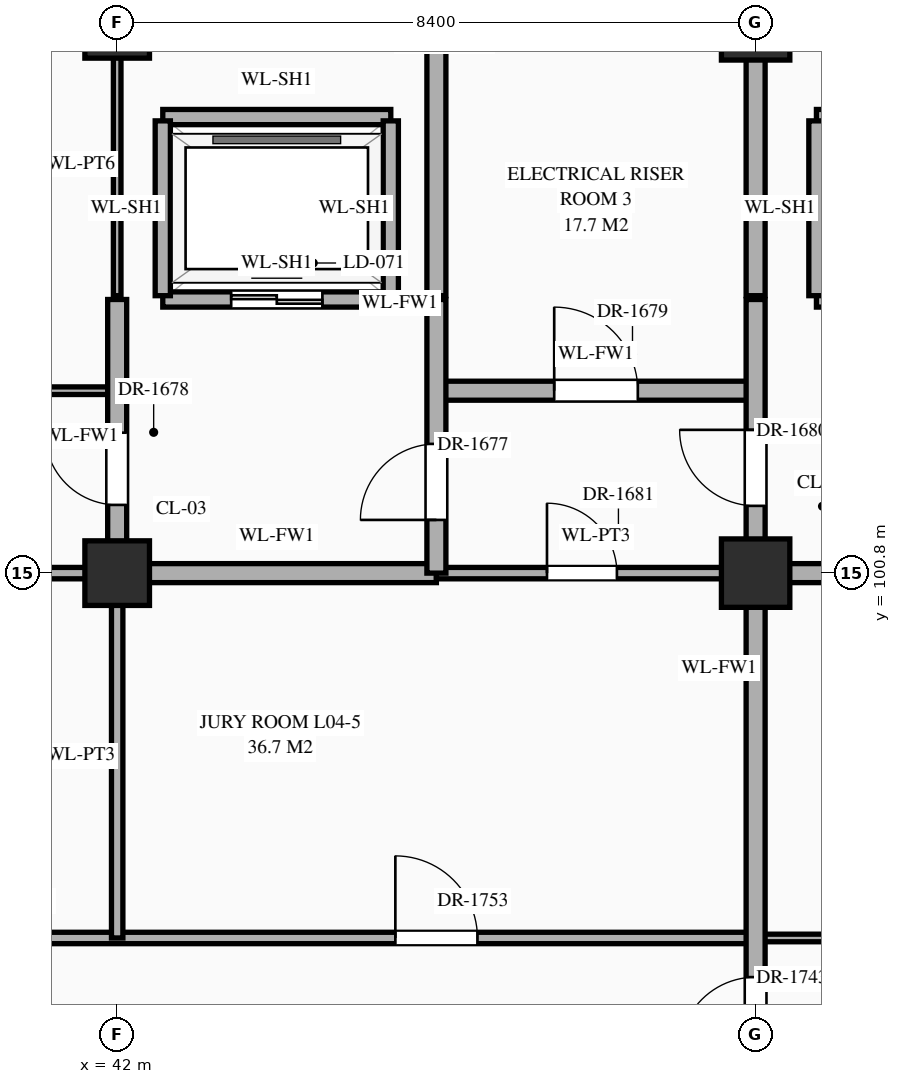
"""IFC4 building model, lengths in metres.
Left out: names, types, materials, properties, quantities, classifications, styles, units other than length and angle.
Written with IfcOpenShell. Run it as: python <this file> out.ifc"""

import sys

from ifc_helpers import new_model, si_unit, direction, frame, frame_2d, origin, origin_2d, place, context, subcontext, project, spatial, rectangle, extrude, element, fill, save


model = new_model("IFC4")
c1 = context("Model", 3, precision=1e-05, world=origin(), true_north=direction((0.0, 1.0)))
c2 = subcontext(c1, "Body", "Model", "MODEL_VIEW")
j1 = project(units=[si_unit("LENGTHUNIT", "METRE"), si_unit("PLANEANGLEUNIT", "RADIAN")], contexts=[c1])
p1 = place(None, origin())
s1 = spatial("IfcSite", under=j1, at=p1, CompositionType="ELEMENT")
p2 = place(p1, origin())
s2 = spatial("IfcBuilding", under=s1, at=p2, CompositionType="ELEMENT")
p3 = place(p2, frame((0.0, 0.0, 16.2)))
s3 = spatial("IfcBuildingStorey", under=s2, at=p3, CompositionType="ELEMENT", Elevation=16.2)
for number, where, z_axis, x_axis in (
    (1, (42.0, 100.8, 0.0), (0.0, 0.0, 1.0), (1.0, 0.0, 0.0)),
    (2, (42.0, 108.0, 0.0), (0.0, 0.0, 1.0), (1.0, 0.0, 0.0)),
):
    element("IfcColumn", number, at=place(p3, frame(where, z_axis=z_axis, x_axis=x_axis)), inside=s3, PredefinedType="COLUMN", context=c2, shape_type="SweptSolid", body=[
        extrude(rectangle(XDim=0.85, YDim=0.85, at=origin_2d()), origin(), (0.0, 0.0, 1.0), 5.4),
    ])
for number, where, z_axis, x_axis in (
    (3, (50.4, 100.8, 0.0), (0.0, 0.0, 1.0), (1.0, 0.0, 0.0)),
    (4, (50.4, 108.0, 0.0), (0.0, 0.0, 1.0), (1.0, 0.0, 0.0)),
):
    element("IfcColumn", number, at=place(p3, frame(where, z_axis=z_axis, x_axis=x_axis)), inside=s3, PredefinedType="COLUMN", context=c2, shape_type="SweptSolid", body=[
        extrude(rectangle(XDim=0.9, YDim=0.9, at=origin_2d()), origin(), (0.0, 0.0, 1.0), 5.4),
    ])
p4 = place(p3, frame((31.0, 96.0, 0.0), z_axis=(0.0, 0.0, 1.0), x_axis=(1.0, 0.0, 0.0)))
e5 = element("IfcWall", 5, at=p4, inside=s3, PredefinedType="STANDARD", context=c2, shape_type="SweptSolid", body=[
    extrude(rectangle(XDim=19.4, YDim=0.15, at=frame_2d((9.7, 0.0))), origin(), (0.0, 0.0, 1.0), 5.12),
])
p5 = place(p4, frame((0.8, 0.0, 0.0)))
e6 = element("IfcOpeningElement", 6, at=p5, cuts=e5, PredefinedType="OPENING", context=c2, shape_type="SweptSolid", body=[
    extrude(rectangle(XDim=1.0, YDim=2.25, at=frame_2d((0.5, 1.125))), frame((0.0, 0.087, 0.0), z_axis=(0.0, -1.0, 0.0), x_axis=(1.0, 0.0, 0.0)), (0.0, 0.0, 1.0), 0.174),
])
p6 = place(p4, frame((6.28, 0.0, 0.0)))
e7 = element("IfcOpeningElement", 7, at=p6, cuts=e5, PredefinedType="OPENING", context=c2, shape_type="SweptSolid", body=[
    extrude(rectangle(XDim=1.04, YDim=2.2, at=frame_2d((0.52, 1.1))), frame((0.0, 0.087, 0.0), z_axis=(0.0, -1.0, 0.0), x_axis=(1.0, 0.0, 0.0)), (0.0, 0.0, 1.0), 0.174),
])
p7 = place(p4, frame((14.66, 0.0, 0.0)))
e8 = element("IfcOpeningElement", 8, at=p7, cuts=e5, PredefinedType="OPENING", context=c2, shape_type="SweptSolid", body=[
    extrude(rectangle(XDim=1.08, YDim=2.25, at=frame_2d((0.54, 1.125))), frame((0.0, 0.087, 0.0), z_axis=(0.0, -1.0, 0.0), x_axis=(1.0, 0.0, 0.0)), (0.0, 0.0, 1.0), 0.174),
])
p8 = place(p3, frame((50.4, 96.0, 0.0), z_axis=(0.0, 0.0, 1.0), x_axis=(1.0, 0.0, 0.0)))
e9 = element("IfcWall", 9, at=p8, inside=s3, PredefinedType="STANDARD", context=c2, shape_type="SweptSolid", body=[
    extrude(rectangle(XDim=5.8, YDim=0.1, at=frame_2d((2.9, 0.0))), origin(), (0.0, 0.0, 1.0), 5.12),
])
p9 = place(p8, frame((1.13, 0.0, 0.0)))
e10 = element("IfcOpeningElement", 10, at=p9, cuts=e9, PredefinedType="OPENING", context=c2, shape_type="SweptSolid", body=[
    extrude(rectangle(XDim=1.14, YDim=2.4, at=frame_2d((0.57, 1.2))), frame((0.0, 0.062, 0.0), z_axis=(0.0, -1.0, 0.0), x_axis=(1.0, 0.0, 0.0)), (0.0, 0.0, 1.0), 0.124),
])
p10 = place(p8, frame((4.15, 0.0, 0.0)))
e11 = element("IfcOpeningElement", 11, at=p10, cuts=e9, PredefinedType="OPENING", context=c2, shape_type="SweptSolid", body=[
    extrude(rectangle(XDim=0.9, YDim=2.15, at=frame_2d((0.45, 1.075))), frame((0.0, 0.062, 0.0), z_axis=(0.0, -1.0, 0.0), x_axis=(1.0, 0.0, 0.0)), (0.0, 0.0, 1.0), 0.124),
])
p11 = place(p3, frame((31.0, 100.8, 0.0), z_axis=(0.0, 0.0, 1.0), x_axis=(1.0, 0.0, 0.0)))
e12 = element("IfcWall", 12, at=p11, inside=s3, PredefinedType="STANDARD", context=c2, shape_type="SweptSolid", body=[
    extrude(rectangle(XDim=11.0, YDim=0.15, at=frame_2d((5.5, 0.0))), origin(), (0.0, 0.0, 1.0), 4.27),
])
p12 = place(p11, frame((0.528, 0.0, 0.0)))
e13 = element("IfcOpeningElement", 13, at=p12, cuts=e12, PredefinedType="OPENING", context=c2, shape_type="SweptSolid", body=[
    extrude(rectangle(XDim=1.2, YDim=2.35, at=frame_2d((0.6, 1.175))), frame((0.0, 0.087, 0.0), z_axis=(0.0, -1.0, 0.0), x_axis=(1.0, 0.0, 0.0)), (0.0, 0.0, 1.0), 0.174),
])
p13 = place(p11, frame((6.18, 0.0, 0.0)))
e14 = element("IfcOpeningElement", 14, at=p13, cuts=e12, PredefinedType="OPENING", context=c2, shape_type="SweptSolid", body=[
    extrude(rectangle(XDim=1.24, YDim=2.3, at=frame_2d((0.62, 1.15))), frame((0.0, 0.087, 0.0), z_axis=(0.0, -1.0, 0.0), x_axis=(1.0, 0.0, 0.0)), (0.0, 0.0, 1.0), 0.174),
])
p14 = place(p3, frame((42.0, 100.8, 0.0), z_axis=(0.0, 0.0, 1.0), x_axis=(1.0, 0.0, 0.0)))
e15 = element("IfcWall", 15, at=p14, inside=s3, PredefinedType="STANDARD", context=c2, shape_type="SweptSolid", body=[
    extrude(rectangle(XDim=4.2, YDim=0.25, at=frame_2d((2.1, 0.0))), origin(), (0.0, 0.0, 1.0), 4.27),
])
p15 = place(p3, frame((46.2, 100.8, 0.0), z_axis=(0.0, 0.0, 1.0), x_axis=(1.0, 0.0, 0.0)))
e16 = element("IfcWall", 16, at=p15, inside=s3, PredefinedType="STANDARD", context=c2, shape_type="SweptSolid", body=[
    extrude(rectangle(XDim=4.2, YDim=0.15, at=frame_2d((2.1, 0.0))), origin(), (0.0, 0.0, 1.0), 4.27),
])
p16 = place(p15, frame((1.455, 0.0, 0.0)))
e17 = element("IfcOpeningElement", 17, at=p16, cuts=e16, PredefinedType="OPENING", context=c2, shape_type="SweptSolid", body=[
    extrude(rectangle(XDim=0.92, YDim=2.15, at=frame_2d((0.46, 1.075))), frame((0.0, 0.087, 0.0), z_axis=(0.0, -1.0, 0.0), x_axis=(1.0, 0.0, 0.0)), (0.0, 0.0, 1.0), 0.174),
])
p17 = place(p3, frame((50.4, 100.8, 0.0), z_axis=(0.0, 0.0, 1.0), x_axis=(1.0, 0.0, 0.0)))
e18 = element("IfcWall", 18, at=p17, inside=s3, PredefinedType="STANDARD", context=c2, shape_type="SweptSolid", body=[
    extrude(rectangle(XDim=3.4, YDim=0.25, at=frame_2d((1.7, 0.0))), origin(), (0.0, 0.0, 1.0), 4.27),
])
p18 = place(p17, frame((1.41, 0.0, 0.0)))
e19 = element("IfcOpeningElement", 19, at=p18, cuts=e18, PredefinedType="OPENING", context=c2, shape_type="SweptSolid", body=[
    extrude(rectangle(XDim=0.95, YDim=2.15, at=frame_2d((0.475, 1.075))), frame((0.0, 0.137, 0.0), z_axis=(0.0, -1.0, 0.0), x_axis=(1.0, 0.0, 0.0)), (0.0, 0.0, 1.0), 0.274),
])
p19 = place(p3, frame((0.04, 103.2, 0.0), z_axis=(0.0, 0.0, 1.0), x_axis=(1.0, 0.0, 0.0)))
e20 = element("IfcWall", 20, at=p19, inside=s3, PredefinedType="STANDARD", context=c2, shape_type="SweptSolid", body=[
    extrude(rectangle(XDim=41.96, YDim=0.1, at=frame_2d((20.98, 0.0))), origin(), (0.0, 0.0, 1.0), 5.05),
])
p20 = place(p19, frame((3.67, 0.0, 0.0)))
e21 = element("IfcOpeningElement", 21, at=p20, cuts=e20, PredefinedType="OPENING", context=c2, shape_type="SweptSolid", body=[
    extrude(rectangle(XDim=1.02, YDim=2.4, at=frame_2d((0.51, 1.2))), frame((0.0, 0.062, 0.0), z_axis=(0.0, -1.0, 0.0), x_axis=(1.0, 0.0, 0.0)), (0.0, 0.0, 1.0), 0.124),
])
p21 = place(p19, frame((12.03, 0.0, 0.0)))
e22 = element("IfcOpeningElement", 22, at=p21, cuts=e20, PredefinedType="OPENING", context=c2, shape_type="SweptSolid", body=[
    extrude(rectangle(XDim=1.06, YDim=2.4, at=frame_2d((0.53, 1.2))), frame((0.0, 0.062, 0.0), z_axis=(0.0, -1.0, 0.0), x_axis=(1.0, 0.0, 0.0)), (0.0, 0.0, 1.0), 0.124),
])
p22 = place(p19, frame((20.39, 0.0, 0.0)))
e23 = element("IfcOpeningElement", 23, at=p22, cuts=e20, PredefinedType="OPENING", context=c2, shape_type="SweptSolid", body=[
    extrude(rectangle(XDim=1.14, YDim=2.4, at=frame_2d((0.57, 1.2))), frame((0.0, 0.062, 0.0), z_axis=(0.0, -1.0, 0.0), x_axis=(1.0, 0.0, 0.0)), (0.0, 0.0, 1.0), 0.124),
])
p23 = place(p19, frame((28.91, 0.0, 0.0)))
e24 = element("IfcOpeningElement", 24, at=p23, cuts=e20, PredefinedType="OPENING", context=c2, shape_type="SweptSolid", body=[
    extrude(rectangle(XDim=0.9, YDim=2.15, at=frame_2d((0.45, 1.075))), frame((0.0, 0.062, 0.0), z_axis=(0.0, -1.0, 0.0), x_axis=(1.0, 0.0, 0.0)), (0.0, 0.0, 1.0), 0.124),
])
p24 = place(p19, frame((37.33, 0.0, 0.0)))
e25 = element("IfcOpeningElement", 25, at=p24, cuts=e20, PredefinedType="OPENING", context=c2, shape_type="SweptSolid", body=[
    extrude(rectangle(XDim=0.86, YDim=2.1, at=frame_2d((0.43, 1.05))), frame((0.0, 0.062, 0.0), z_axis=(0.0, -1.0, 0.0), x_axis=(1.0, 0.0, 0.0)), (0.0, 0.0, 1.0), 0.124),
])
p25 = place(p3, frame((46.2, 103.2, 0.0), z_axis=(0.0, 0.0, 1.0), x_axis=(1.0, 0.0, 0.0)))
e26 = element("IfcWall", 26, at=p25, inside=s3, PredefinedType="STANDARD", context=c2, shape_type="SweptSolid", body=[
    extrude(rectangle(XDim=4.2, YDim=0.25, at=frame_2d((2.1, 0.0))), origin(), (0.0, 0.0, 1.0), 5.12),
])
p26 = place(p25, frame((1.55, 0.0, 0.0)))
e27 = element("IfcOpeningElement", 27, at=p26, cuts=e26, PredefinedType="OPENING", context=c2, shape_type="SweptSolid", body=[
    extrude(rectangle(XDim=1.1, YDim=2.2, at=frame_2d((0.55, 1.1))), frame((0.0, 0.137, 0.0), z_axis=(0.0, -1.0, 0.0), x_axis=(1.0, 0.0, 0.0)), (0.0, 0.0, 1.0), 0.274),
])
p27 = place(p3, frame((42.6, 104.4, 0.0), z_axis=(0.0, 0.0, 1.0), x_axis=(1.0, 0.0, 0.0)))
e28 = element("IfcWall", 28, at=p27, inside=s3, PredefinedType="STANDARD", context=c2, shape_type="SweptSolid", body=[
    extrude(rectangle(XDim=3.0, YDim=0.2, at=frame_2d((1.5, 0.0))), origin(), (0.0, 0.0, 1.0), 5.12),
])
p28 = place(p27, frame((0.9, 0.0, 0.0)))
e29 = element("IfcOpeningElement", 29, at=p28, cuts=e28, PredefinedType="OPENING", context=c2, shape_type="SweptSolid", body=[
    extrude(rectangle(XDim=1.2, YDim=2.15, at=frame_2d((0.6, 1.075))), frame((0.0, 0.112, 0.0), z_axis=(0.0, -1.0, 0.0), x_axis=(1.0, 0.0, 0.0)), (0.0, 0.0, 1.0), 0.224),
])
p29 = place(p3, frame((51.2, 104.4, 0.0), z_axis=(0.0, 0.0, 1.0), x_axis=(1.0, 0.0, 0.0)))
e30 = element("IfcWall", 30, at=p29, inside=s3, PredefinedType="STANDARD", context=c2, shape_type="SweptSolid", body=[
    extrude(rectangle(XDim=2.4, YDim=0.2, at=frame_2d((1.2, 0.0))), origin(), (0.0, 0.0, 1.0), 5.12),
])
p30 = place(p29, frame((0.675, 0.0, 0.0)))
e31 = element("IfcOpeningElement", 31, at=p30, cuts=e30, PredefinedType="OPENING", context=c2, shape_type="SweptSolid", body=[
    extrude(rectangle(XDim=1.05, YDim=2.15, at=frame_2d((0.525, 1.075))), frame((0.0, 0.112, 0.0), z_axis=(0.0, -1.0, 0.0), x_axis=(1.0, 0.0, 0.0)), (0.0, 0.0, 1.0), 0.224),
])
p31 = place(p3, frame((42.6, 106.8, 0.0), z_axis=(0.0, 0.0, 1.0), x_axis=(1.0, 0.0, 0.0)))
e32 = element("IfcWall", 32, at=p31, inside=s3, PredefinedType="STANDARD", context=c2, shape_type="SweptSolid", body=[
    extrude(rectangle(XDim=3.0, YDim=0.2, at=frame_2d((1.5, 0.0))), origin(), (0.0, 0.0, 1.0), 5.12),
])
p32 = place(p3, frame((51.2, 106.8, 0.0), z_axis=(0.0, 0.0, 1.0), x_axis=(1.0, 0.0, 0.0)))
e33 = element("IfcWall", 33, at=p32, inside=s3, PredefinedType="STANDARD", context=c2, shape_type="SweptSolid", body=[
    extrude(rectangle(XDim=2.4, YDim=0.2, at=frame_2d((1.2, 0.0))), origin(), (0.0, 0.0, 1.0), 5.12),
])
p33 = place(p3, frame((42.0, 96.0, 0.0), z_axis=(0.0, 0.0, 1.0), x_axis=(0.0, 1.0, 0.0)))
e34 = element("IfcWall", 34, at=p33, inside=s3, PredefinedType="STANDARD", context=c2, shape_type="SweptSolid", body=[
    extrude(rectangle(XDim=4.8, YDim=0.15, at=frame_2d((2.4, 0.0))), origin(), (0.0, 0.0, 1.0), 4.37),
])
p34 = place(p3, frame((42.0, 100.8, 0.0), z_axis=(0.0, 0.0, 1.0), x_axis=(0.0, 1.0, 0.0)))
e35 = element("IfcWall", 35, at=p34, inside=s3, PredefinedType="STANDARD", context=c2, shape_type="SweptSolid", body=[
    extrude(rectangle(XDim=3.6, YDim=0.25, at=frame_2d((1.8, 0.0))), origin(), (0.0, 0.0, 1.0), 4.37),
])
p35 = place(p34, frame((0.897, 0.0, 0.0)))
e36 = element("IfcOpeningElement", 36, at=p35, cuts=e35, PredefinedType="OPENING", context=c2, shape_type="SweptSolid", body=[
    extrude(rectangle(XDim=0.95, YDim=2.15, at=frame_2d((0.475, 1.075))), frame((0.0, 0.137, 0.0), z_axis=(0.0, -1.0, 0.0), x_axis=(1.0, 0.0, 0.0)), (0.0, 0.0, 1.0), 0.274),
])
p36 = place(p3, frame((42.0, 104.45, 0.0), z_axis=(0.0, 0.0, 1.0), x_axis=(0.0, 1.0, 0.0)))
e37 = element("IfcWall", 37, at=p36, inside=s3, PredefinedType="STANDARD", context=c2, shape_type="SweptSolid", body=[
    extrude(rectangle(XDim=3.46, YDim=0.1, at=frame_2d((1.73, 0.0))), origin(), (0.0, 0.0, 1.0), 4.37),
])
for number, where, z_axis, x_axis in (
    (38, (42.6, 104.45, 0.0), (0.0, 0.0, 1.0), (0.0, 1.0, 0.0)),
    (39, (45.6, 104.45, 0.0), (0.0, 0.0, 1.0), (0.0, 1.0, 0.0)),
):
    element("IfcWall", number, at=place(p3, frame(where, z_axis=z_axis, x_axis=x_axis)), inside=s3, PredefinedType="STANDARD", context=c2, shape_type="SweptSolid", body=[
        extrude(rectangle(XDim=2.3, YDim=0.2, at=frame_2d((1.15, 0.0))), origin(), (0.0, 0.0, 1.0), 5.12),
    ])
p37 = place(p3, frame((46.2, 100.8, 0.0), z_axis=(0.0, 0.0, 1.0), x_axis=(0.0, 1.0, 0.0)))
e40 = element("IfcWall", 40, at=p37, inside=s3, PredefinedType="STANDARD", context=c2, shape_type="SweptSolid", body=[
    extrude(rectangle(XDim=3.6, YDim=0.25, at=frame_2d((1.8, 0.0))), origin(), (0.0, 0.0, 1.0), 4.72),
])
p38 = place(p37, frame((0.7, 0.0, 0.0)))
e41 = element("IfcOpeningElement", 41, at=p38, cuts=e40, PredefinedType="OPENING", context=c2, shape_type="SweptSolid", body=[
    extrude(rectangle(XDim=1.0, YDim=2.2, at=frame_2d((0.5, 1.1))), frame((0.0, 0.137, 0.0), z_axis=(0.0, -1.0, 0.0), x_axis=(1.0, 0.0, 0.0)), (0.0, 0.0, 1.0), 0.274),
])
p39 = place(p3, frame((46.2, 104.45, 0.0), z_axis=(0.0, 0.0, 1.0), x_axis=(0.0, 1.0, 0.0)))
e42 = element("IfcWall", 42, at=p39, inside=s3, PredefinedType="STANDARD", context=c2, shape_type="SweptSolid", body=[
    extrude(rectangle(XDim=3.46, YDim=0.25, at=frame_2d((1.73, 0.0))), origin(), (0.0, 0.0, 1.0), 4.72),
])
p40 = place(p3, frame((50.4, 91.2, 0.0), z_axis=(0.0, 0.0, 1.0), x_axis=(0.0, 1.0, 0.0)))
e43 = element("IfcWall", 43, at=p40, inside=s3, PredefinedType="STANDARD", context=c2, shape_type="SweptSolid", body=[
    extrude(rectangle(XDim=13.2, YDim=0.25, at=frame_2d((6.6, 0.0))), origin(), (0.0, 0.0, 1.0), 4.37),
])
p41 = place(p40, frame((0.515, 0.0, 0.0)))
e44 = element("IfcOpeningElement", 44, at=p41, cuts=e43, PredefinedType="OPENING", context=c2, shape_type="SweptSolid", body=[
    extrude(rectangle(XDim=1.0, YDim=2.2, at=frame_2d((0.5, 1.1))), frame((0.0, 0.137, 0.0), z_axis=(0.0, -1.0, 0.0), x_axis=(1.0, 0.0, 0.0)), (0.0, 0.0, 1.0), 0.274),
])
p42 = place(p40, frame((10.485, 0.0, 0.0)))
e45 = element("IfcOpeningElement", 45, at=p42, cuts=e43, PredefinedType="OPENING", context=c2, shape_type="SweptSolid", body=[
    extrude(rectangle(XDim=1.0, YDim=2.2, at=frame_2d((0.5, 1.1))), frame((0.0, 0.137, 0.0), z_axis=(0.0, -1.0, 0.0), x_axis=(1.0, 0.0, 0.0)), (0.0, 0.0, 1.0), 0.274),
])
p43 = place(p40, frame((3.285, 0.0, 0.0)))
e46 = element("IfcOpeningElement", 46, at=p43, cuts=e43, PredefinedType="OPENING", context=c2, shape_type="SweptSolid", body=[
    extrude(rectangle(XDim=1.0, YDim=2.2, at=frame_2d((0.5, 1.1))), frame((0.0, 0.137, 0.0), z_axis=(0.0, -1.0, 0.0), x_axis=(1.0, 0.0, 0.0)), (0.0, 0.0, 1.0), 0.274),
])
p44 = place(p3, frame((50.4, 104.45, 0.0), z_axis=(0.0, 0.0, 1.0), x_axis=(0.0, 1.0, 0.0)))
e47 = element("IfcWall", 47, at=p44, inside=s3, PredefinedType="STANDARD", context=c2, shape_type="SweptSolid", body=[
    extrude(rectangle(XDim=3.46, YDim=0.25, at=frame_2d((1.73, 0.0))), origin(), (0.0, 0.0, 1.0), 4.37),
])
p45 = place(p3, frame((51.2, 104.45, 0.0), z_axis=(0.0, 0.0, 1.0), x_axis=(0.0, 1.0, 0.0)))
e48 = element("IfcWall", 48, at=p45, inside=s3, PredefinedType="STANDARD", context=c2, shape_type="SweptSolid", body=[
    extrude(rectangle(XDim=2.3, YDim=0.2, at=frame_2d((1.15, 0.0))), origin(), (0.0, 0.0, 1.0), 5.12),
])
p46 = place(p28, origin())
e49 = element("IfcDoor", 49, at=p46, inside=s3, OperationType="DOUBLE_DOOR_SLIDING", PredefinedType="DOOR", context=c2, shape_type="SweptSolid", body=[
    extrude(rectangle(XDim=1.2, YDim=2.15, at=frame_2d((0.6, 1.075))), frame((0.0, 0.025, 0.0), z_axis=(0.0, -1.0, 0.0), x_axis=(1.0, 0.0, 0.0)), (0.0, 0.0, 1.0), 0.05),
])
fill(e29, e49)
p47 = place(p38, origin())
e50 = element("IfcDoor", 50, at=p47, inside=s3, OperationType="SINGLE_SWING_LEFT", PredefinedType="DOOR", context=c2, shape_type="SweptSolid", body=[
    extrude(rectangle(XDim=1.0, YDim=2.2, at=frame_2d((0.5, 1.1))), frame((0.0, 0.025, 0.0), z_axis=(0.0, -1.0, 0.0), x_axis=(1.0, 0.0, 0.0)), (0.0, 0.0, 1.0), 0.05),
])
fill(e41, e50)
p48 = place(p35, origin())
e51 = element("IfcDoor", 51, at=p48, inside=s3, OperationType="SINGLE_SWING_RIGHT", PredefinedType="DOOR", context=c2, shape_type="SweptSolid", body=[
    extrude(rectangle(XDim=0.95, YDim=2.15, at=frame_2d((0.475, 1.075))), frame((0.0, 0.025, 0.0), z_axis=(0.0, -1.0, 0.0), x_axis=(1.0, 0.0, 0.0)), (0.0, 0.0, 1.0), 0.05),
])
fill(e36, e51)
p49 = place(p26, origin())
e52 = element("IfcDoor", 52, at=p49, inside=s3, OperationType="SINGLE_SWING_LEFT", PredefinedType="DOOR", context=c2, shape_type="SweptSolid", body=[
    extrude(rectangle(XDim=1.1, YDim=2.2, at=frame_2d((0.55, 1.1))), frame((0.0, 0.025, 0.0), z_axis=(0.0, -1.0, 0.0), x_axis=(1.0, 0.0, 0.0)), (0.0, 0.0, 1.0), 0.05),
])
fill(e27, e52)
p50 = place(p42, origin())
e53 = element("IfcDoor", 53, at=p50, inside=s3, OperationType="SINGLE_SWING_RIGHT", PredefinedType="DOOR", context=c2, shape_type="SweptSolid", body=[
    extrude(rectangle(XDim=1.0, YDim=2.2, at=frame_2d((0.5, 1.1))), frame((0.0, 0.025, 0.0), z_axis=(0.0, -1.0, 0.0), x_axis=(1.0, 0.0, 0.0)), (0.0, 0.0, 1.0), 0.05),
])
fill(e45, e53)
p51 = place(p16, origin())
e54 = element("IfcDoor", 54, at=p51, inside=s3, OperationType="SINGLE_SWING_LEFT", PredefinedType="DOOR", context=c2, shape_type="SweptSolid", body=[
    extrude(rectangle(XDim=0.92, YDim=2.15, at=frame_2d((0.46, 1.075))), frame((0.0, 0.025, 0.0), z_axis=(0.0, -1.0, 0.0), x_axis=(1.0, 0.0, 0.0)), (0.0, 0.0, 1.0), 0.05),
])
fill(e17, e54)
p52 = place(p43, origin())
e55 = element("IfcDoor", 55, at=p52, inside=s3, OperationType="SINGLE_SWING_LEFT", PredefinedType="DOOR", context=c2, shape_type="SweptSolid", body=[
    extrude(rectangle(XDim=1.0, YDim=2.2, at=frame_2d((0.5, 1.1))), frame((0.0, 0.025, 0.0), z_axis=(0.0, -1.0, 0.0), x_axis=(1.0, 0.0, 0.0)), (0.0, 0.0, 1.0), 0.05),
])
fill(e46, e55)
p53 = place(p7, origin())
e56 = element("IfcDoor", 56, at=p53, inside=s3, OperationType="SINGLE_SWING_LEFT", PredefinedType="DOOR", context=c2, shape_type="SweptSolid", body=[
    extrude(rectangle(XDim=1.08, YDim=2.25, at=frame_2d((0.54, 1.125))), frame((0.0, 0.025, 0.0), z_axis=(0.0, -1.0, 0.0), x_axis=(1.0, 0.0, 0.0)), (0.0, 0.0, 1.0), 0.05),
])
fill(e8, e56)
save(model, sys.argv[1])
